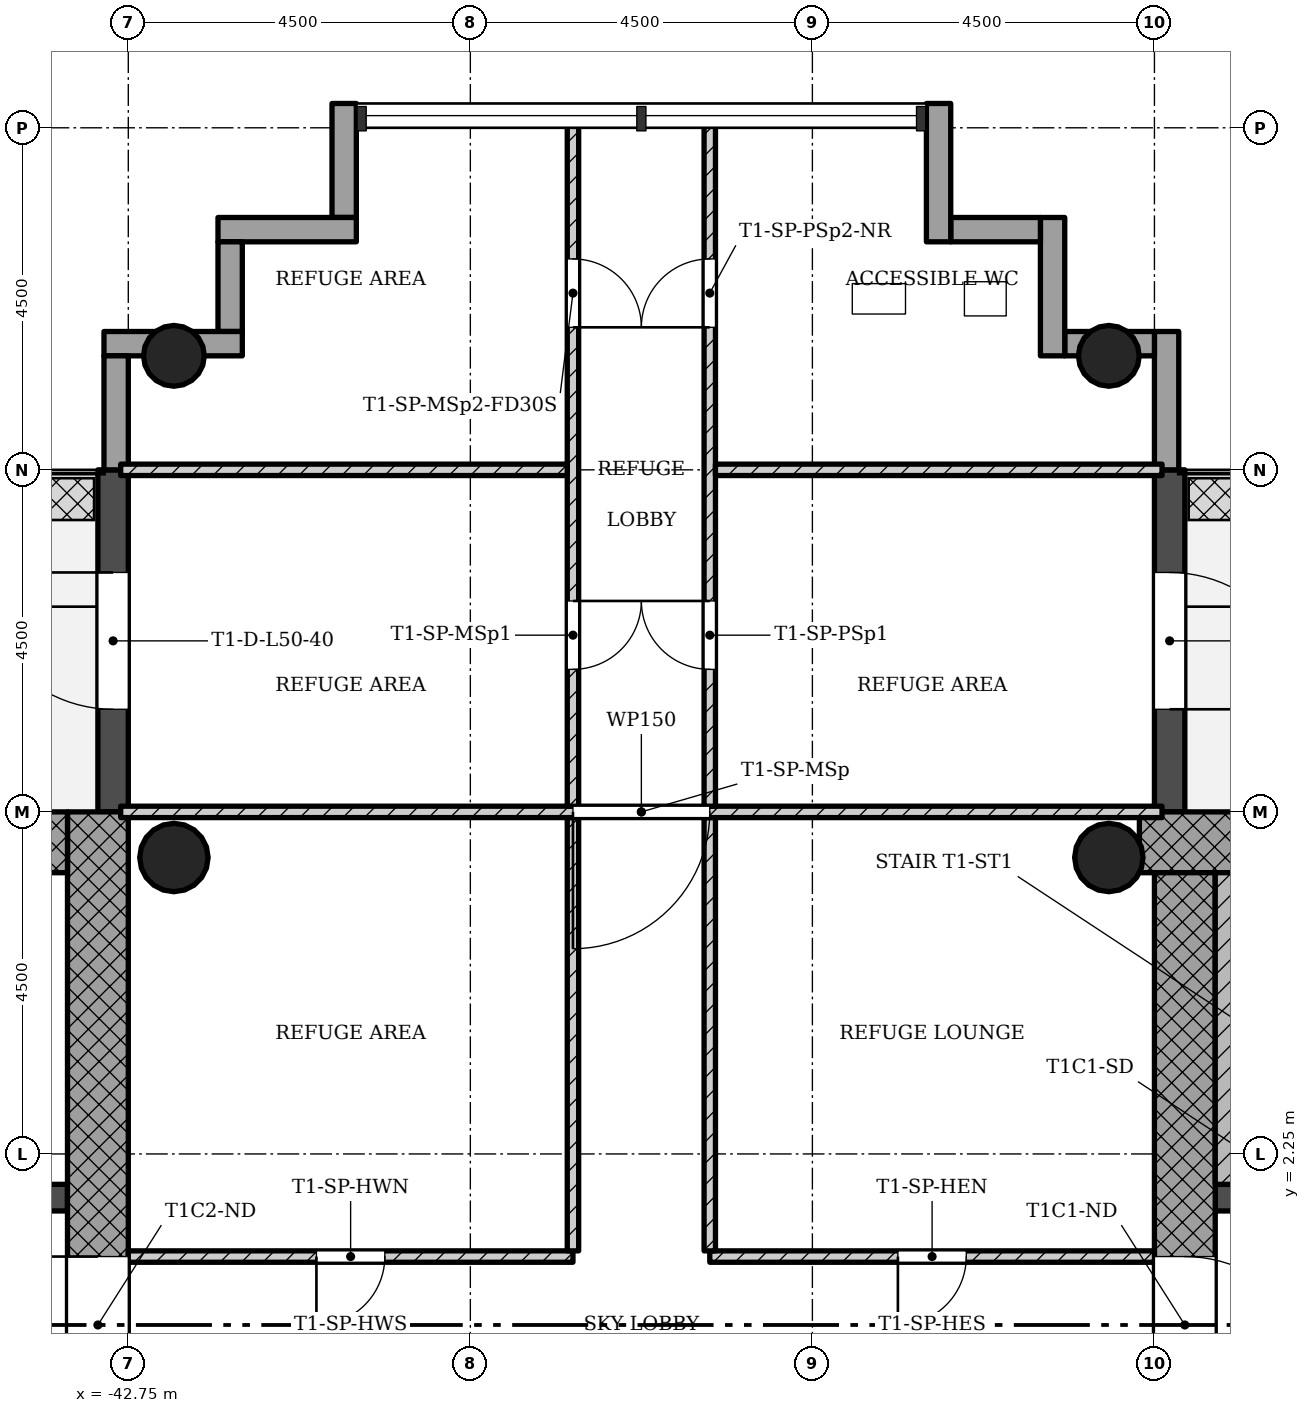
"""IFC4 building model, lengths in metres.
Left out: names, types, materials, properties, quantities, classifications, styles, units other than length and angle.
Written with IfcOpenShell. Run it as: python <this file> out.ifc"""

import sys

from ifc_helpers import new_model, si_unit, direction, frame, frame_2d, origin, origin_2d, place, context, subcontext, project, spatial, rectangle, hollow_circle, extrude, element, fill, save


model = new_model("IFC4")
c1 = context("Model", 3, precision=1e-05, world=origin(), true_north=direction((0.0, 1.0)))
c2 = subcontext(c1, "Body", "Model", "MODEL_VIEW")
j1 = project(units=[si_unit("LENGTHUNIT", "METRE"), si_unit("PLANEANGLEUNIT", "RADIAN")], contexts=[c1])
p1 = place(None, origin())
s1 = spatial("IfcSite", under=j1, at=p1, CompositionType="ELEMENT")
p2 = place(p1, origin())
s2 = spatial("IfcBuilding", under=s1, at=p2, CompositionType="ELEMENT")
p3 = place(p2, frame((0.0, 0.0, 181.3)))
s3 = spatial("IfcBuildingStorey", under=s2, at=p3, CompositionType="ELEMENT", Elevation=181.3)
p4 = place(p3, frame((-20.652, 6.35, 0.0), z_axis=(0.0, 0.0, 1.0), x_axis=(-1.0, 0.0, 0.0)))
e1 = element("IfcWall", 1, at=p4, inside=s3, PredefinedType="SHEAR", context=c2, shape_type="SweptSolid", body=[
    extrude(rectangle(XDim=8.796, YDim=0.8, at=frame_2d((4.398, 0.0))), origin(), (0.0, 0.0, 1.0), 4.5),
])
p5 = place(p3, frame((-28.85, 5.95, 0.0), z_axis=(0.0, 0.0, 1.0), x_axis=(0.0, -1.0, 0.0)))
e2 = element("IfcWall", 2, at=p5, inside=s3, PredefinedType="SHEAR", context=c2, shape_type="SweptSolid", body=[
    extrude(rectangle(XDim=12.7, YDim=0.8, at=frame_2d((6.35, 0.0))), origin(), (0.0, 0.0, 1.0), 4.5),
])
p6 = place(p5, frame((5.05, 0.0, 0.0)))
e3 = element("IfcOpeningElement", 3, at=p6, cuts=e2, PredefinedType="OPENING", context=c2, shape_type="SweptSolid", body=[
    extrude(rectangle(XDim=1.8, YDim=2.1, at=frame_2d((0.9, 1.05))), frame((0.0, 0.41, 0.0), z_axis=(0.0, -1.0, 0.0), x_axis=(1.0, 0.0, 0.0)), (0.0, 0.0, 1.0), 0.82),
])
p7 = place(p3, frame((-28.45, 1.675, 0.0), z_axis=(0.0, 0.0, 1.0), x_axis=(1.0, 0.0, 0.0)))
e4 = element("IfcWall", 4, at=p7, inside=s3, PredefinedType="SHEAR", context=c2, shape_type="SweptSolid", body=[
    extrude(rectangle(XDim=7.4, YDim=0.35, at=frame_2d((3.7, 0.0))), origin(), (0.0, 0.0, 1.0), 4.5),
])
p8 = place(p7, frame((0.85, 0.0, 0.0)))
e5 = element("IfcOpeningElement", 5, at=p8, cuts=e4, PredefinedType="OPENING", context=c2, shape_type="SweptSolid", body=[
    extrude(rectangle(XDim=0.9, YDim=2.1, at=frame_2d((0.45, 1.05))), frame((0.0, 0.185, 0.0), z_axis=(0.0, -1.0, 0.0), x_axis=(1.0, 0.0, 0.0)), (0.0, 0.0, 1.0), 0.37),
])
p9 = place(p3, frame((-43.15, -5.95, 0.0), z_axis=(0.0, 0.0, 1.0), x_axis=(0.0, 1.0, 0.0)))
e6 = element("IfcWall", 6, at=p9, inside=s3, PredefinedType="SHEAR", context=c2, shape_type="SweptSolid", body=[
    extrude(rectangle(XDim=12.7, YDim=0.8, at=frame_2d((6.35, 0.0))), origin(), (0.0, 0.0, 1.0), 4.5),
])
p10 = place(p9, frame((5.05, 0.0, 0.0)))
e7 = element("IfcOpeningElement", 7, at=p10, cuts=e6, PredefinedType="OPENING", context=c2, shape_type="SweptSolid", body=[
    extrude(rectangle(XDim=1.8, YDim=2.1, at=frame_2d((0.9, 1.05))), frame((0.0, 0.41, 0.0), z_axis=(0.0, -1.0, 0.0), x_axis=(1.0, 0.0, 0.0)), (0.0, 0.0, 1.0), 0.82),
])
p11 = place(p3, frame((-43.55, 6.35, 0.0), z_axis=(0.0, 0.0, 1.0), x_axis=(-1.0, 0.0, 0.0)))
e8 = element("IfcWall", 8, at=p11, inside=s3, PredefinedType="SHEAR", context=c2, shape_type="SweptSolid", body=[
    extrude(rectangle(XDim=8.2, YDim=0.8, at=frame_2d((4.1, 0.0))), origin(), (0.0, 0.0, 1.0), 4.5),
])
p12 = place(p3, frame((-50.95, 1.675, 0.0), z_axis=(0.0, 0.0, 1.0), x_axis=(1.0, 0.0, 0.0)))
e9 = element("IfcWall", 9, at=p12, inside=s3, PredefinedType="SHEAR", context=c2, shape_type="SweptSolid", body=[
    extrude(rectangle(XDim=7.4, YDim=0.35, at=frame_2d((3.7, 0.0))), origin(), (0.0, 0.0, 1.0), 4.5),
])
p13 = place(p12, frame((5.35, 0.0, 0.0)))
e10 = element("IfcOpeningElement", 10, at=p13, cuts=e9, PredefinedType="OPENING", context=c2, shape_type="SweptSolid", body=[
    extrude(rectangle(XDim=1.1, YDim=2.1, at=frame_2d((0.55, 1.05))), frame((0.0, 0.185, 0.0), z_axis=(0.0, -1.0, 0.0), x_axis=(1.0, 0.0, 0.0)), (0.0, 0.0, 1.0), 0.37),
])
p14 = place(p12, frame((1.0, 0.0, 0.0)))
e11 = element("IfcOpeningElement", 11, at=p14, cuts=e9, PredefinedType="OPENING", context=c2, shape_type="SweptSolid", body=[
    extrude(rectangle(XDim=1.1, YDim=2.1, at=frame_2d((0.55, 1.05))), frame((0.0, 0.185, 0.0), z_axis=(0.0, -1.0, 0.0), x_axis=(1.0, 0.0, 0.0)), (0.0, 0.0, 1.0), 0.37),
])
p15 = place(p12, frame((3.3, 0.0, 0.0)))
e12 = element("IfcOpeningElement", 12, at=p15, cuts=e9, PredefinedType="OPENING", context=c2, shape_type="SweptSolid", body=[
    extrude(rectangle(XDim=0.9, YDim=2.1, at=frame_2d((0.45, 1.05))), frame((0.0, 0.185, 0.0), z_axis=(0.0, -1.0, 0.0), x_axis=(1.0, 0.0, 0.0)), (0.0, 0.0, 1.0), 0.37),
])
for number, where, z_axis, x_axis in (
    (13, (-29.85, 12.75, 0.0), (0.0, 0.0, 1.0), (1.0, 0.0, 0.0)),
    (14, (-42.15, 12.75, 0.0), (0.0, 0.0, 1.0), (1.0, 0.0, 0.0)),
):
    element("IfcColumn", number, at=place(p3, frame(where, z_axis=z_axis, x_axis=x_axis)), inside=s3, PredefinedType="COLUMN", context=c2, shape_type="SweptSolid", body=[
        extrude(hollow_circle(Radius=0.4, WallThickness=0.028, at=origin_2d()), origin(), (0.0, 0.0, 1.0), 4.5),
    ])
for number, where, z_axis, x_axis in (
    (15, (-29.85, 6.15, 0.0), (0.0, 0.0, 1.0), (1.0, 0.0, 0.0)),
    (16, (-42.15, 6.15, 0.0), (0.0, 0.0, 1.0), (1.0, 0.0, 0.0)),
):
    element("IfcColumn", number, at=place(p3, frame(where, z_axis=z_axis, x_axis=x_axis)), inside=s3, PredefinedType="COLUMN", context=c2, shape_type="SweptSolid", body=[
        extrude(hollow_circle(Radius=0.45, WallThickness=0.032, at=origin_2d()), origin(), (0.0, 0.0, 1.0), 4.5),
    ])
p16 = place(p3, frame((-29.05, 6.75, -0.02), z_axis=(0.0, 0.0, 1.0), x_axis=(0.0, 1.0, 0.0)))
e17 = element("IfcWall", 17, at=p16, inside=s3, PredefinedType="STANDARD", context=c2, shape_type="SweptSolid", body=[
    extrude(rectangle(XDim=4.5, YDim=0.4, at=frame_2d((2.25, 0.0))), origin(), (0.0, 0.0, 1.0), 4.22),
])
p17 = place(p16, frame((1.35, 0.0, 0.02)))
e18 = element("IfcOpeningElement", 18, at=p17, cuts=e17, PredefinedType="OPENING", context=c2, shape_type="SweptSolid", body=[
    extrude(rectangle(XDim=1.8, YDim=2.1, at=frame_2d((0.9, 1.05))), frame((0.0, 0.21, 0.0), z_axis=(0.0, -1.0, 0.0), x_axis=(1.0, 0.0, 0.0)), (0.0, 0.0, 1.0), 0.42),
])
p18 = place(p3, frame((-29.09, 11.25, -0.3), z_axis=(0.0, 0.0, 1.0), x_axis=(0.0, 1.0, 0.0)))
e19 = element("IfcWall", 19, at=p18, inside=s3, PredefinedType="STANDARD", context=c2, shape_type="SweptSolid", body=[
    extrude(rectangle(XDim=1.82, YDim=0.32, at=frame_2d((0.91, 0.0))), origin(), (0.0, 0.0, 1.0), 4.5),
])
p19 = place(p3, frame((-29.25, 12.91, -0.3), z_axis=(0.0, 0.0, 1.0), x_axis=(-1.0, 0.0, 0.0)))
e20 = element("IfcWall", 20, at=p19, inside=s3, PredefinedType="STANDARD", context=c2, shape_type="SweptSolid", body=[
    extrude(rectangle(XDim=1.18, YDim=0.32, at=frame_2d((0.59, 0.0))), origin(), (0.0, 0.0, 1.0), 4.5),
])
p20 = place(p3, frame((-30.59, 12.75, -0.3), z_axis=(0.0, 0.0, 1.0), x_axis=(0.0, 1.0, 0.0)))
e21 = element("IfcWall", 21, at=p20, inside=s3, PredefinedType="STANDARD", context=c2, shape_type="SweptSolid", body=[
    extrude(rectangle(XDim=1.82, YDim=0.32, at=frame_2d((0.91, 0.0))), origin(), (0.0, 0.0, 1.0), 4.5),
])
p21 = place(p3, frame((-30.75, 14.41, -0.3), z_axis=(0.0, 0.0, 1.0), x_axis=(-1.0, 0.0, 0.0)))
e22 = element("IfcWall", 22, at=p21, inside=s3, PredefinedType="STANDARD", context=c2, shape_type="SweptSolid", body=[
    extrude(rectangle(XDim=1.18, YDim=0.32, at=frame_2d((0.59, 0.0))), origin(), (0.0, 0.0, 1.0), 4.5),
])
p22 = place(p3, frame((-32.09, 14.25, -0.3), z_axis=(0.0, 0.0, 1.0), x_axis=(0.0, 1.0, 0.0)))
e23 = element("IfcWall", 23, at=p22, inside=s3, PredefinedType="STANDARD", context=c2, shape_type="SweptSolid", body=[
    extrude(rectangle(XDim=1.82, YDim=0.32, at=frame_2d((0.91, 0.0))), origin(), (0.0, 0.0, 1.0), 4.5),
])
p23 = place(p3, frame((-39.91, 16.07, -0.3), z_axis=(0.0, 0.0, 1.0), x_axis=(0.0, -1.0, 0.0)))
e24 = element("IfcWall", 24, at=p23, inside=s3, PredefinedType="STANDARD", context=c2, shape_type="SweptSolid", body=[
    extrude(rectangle(XDim=1.5, YDim=0.32, at=frame_2d((0.75, 0.0))), origin(), (0.0, 0.0, 1.0), 4.5),
])
p24 = place(p3, frame((-39.75, 14.41, -0.3), z_axis=(0.0, 0.0, 1.0), x_axis=(-1.0, 0.0, 0.0)))
e25 = element("IfcWall", 25, at=p24, inside=s3, PredefinedType="STANDARD", context=c2, shape_type="SweptSolid", body=[
    extrude(rectangle(XDim=1.82, YDim=0.32, at=frame_2d((0.91, 0.0))), origin(), (0.0, 0.0, 1.0), 4.5),
])
p25 = place(p3, frame((-41.41, 14.25, -0.3), z_axis=(0.0, 0.0, 1.0), x_axis=(0.0, -1.0, 0.0)))
e26 = element("IfcWall", 26, at=p25, inside=s3, PredefinedType="STANDARD", context=c2, shape_type="SweptSolid", body=[
    extrude(rectangle(XDim=1.18, YDim=0.32, at=frame_2d((0.59, 0.0))), origin(), (0.0, 0.0, 1.0), 4.5),
])
p26 = place(p3, frame((-41.25, 12.91, -0.3), z_axis=(0.0, 0.0, 1.0), x_axis=(-1.0, 0.0, 0.0)))
e27 = element("IfcWall", 27, at=p26, inside=s3, PredefinedType="STANDARD", context=c2, shape_type="SweptSolid", body=[
    extrude(rectangle(XDim=1.82, YDim=0.32, at=frame_2d((0.91, 0.0))), origin(), (0.0, 0.0, 1.0), 4.5),
])
p27 = place(p3, frame((-42.91, 12.75, -0.3), z_axis=(0.0, 0.0, 1.0), x_axis=(0.0, -1.0, 0.0)))
e28 = element("IfcWall", 28, at=p27, inside=s3, PredefinedType="STANDARD", context=c2, shape_type="SweptSolid", body=[
    extrude(rectangle(XDim=1.5, YDim=0.32, at=frame_2d((0.75, 0.0))), origin(), (0.0, 0.0, 1.0), 4.5),
])
p28 = place(p3, frame((-42.95, 11.25, -0.02), z_axis=(0.0, 0.0, 1.0), x_axis=(0.0, -1.0, 0.0)))
e29 = element("IfcWall", 29, at=p28, inside=s3, PredefinedType="STANDARD", context=c2, shape_type="SweptSolid", body=[
    extrude(rectangle(XDim=4.5, YDim=0.4, at=frame_2d((2.25, 0.0))), origin(), (0.0, 0.0, 1.0), 4.22),
])
p29 = place(p28, frame((1.35, 0.0, 0.02)))
e30 = element("IfcOpeningElement", 30, at=p29, cuts=e29, PredefinedType="OPENING", context=c2, shape_type="SweptSolid", body=[
    extrude(rectangle(XDim=1.8, YDim=2.1, at=frame_2d((0.9, 1.05))), frame((0.0, 0.21, 0.0), z_axis=(0.0, -1.0, 0.0), x_axis=(1.0, 0.0, 0.0)), (0.0, 0.0, 1.0), 0.42),
])
p30 = place(p3, frame((-35.1, 0.9, 0.0), z_axis=(0.0, 0.0, 1.0), x_axis=(1.0, 0.0, 0.0)))
e31 = element("IfcWall", 31, at=p30, inside=s3, PredefinedType="PARTITIONING", context=c2, shape_type="SweptSolid", body=[
    extrude(rectangle(XDim=5.85, YDim=0.15, at=frame_2d((2.925, 0.0))), origin(), (0.0, 0.0, 1.0), 4.08),
])
p31 = place(p30, frame((2.475, 0.0, 0.0)))
e32 = element("IfcOpeningElement", 32, at=p31, cuts=e31, PredefinedType="OPENING", context=c2, shape_type="SweptSolid", body=[
    extrude(rectangle(XDim=0.9, YDim=2.1, at=frame_2d((0.45, 1.05))), frame((0.0, 0.085, 0.0), z_axis=(0.0, -1.0, 0.0), x_axis=(1.0, 0.0, 0.0)), (0.0, 0.0, 1.0), 0.17),
])
p32 = place(p3, frame((-35.1, 0.975, 0.0), z_axis=(0.0, 0.0, 1.0), x_axis=(0.0, 1.0, 0.0)))
e33 = element("IfcWall", 33, at=p32, inside=s3, PredefinedType="PARTITIONING", context=c2, shape_type="SweptSolid", body=[
    extrude(rectangle(XDim=5.7, YDim=0.15, at=frame_2d((2.85, 0.0))), origin(), (0.0, 0.0, 1.0), 4.08),
])
p33 = place(p3, frame((-42.75, 0.9, 0.0), z_axis=(0.0, 0.0, 1.0), x_axis=(1.0, 0.0, 0.0)))
e34 = element("IfcWall", 34, at=p33, inside=s3, PredefinedType="PARTITIONING", context=c2, shape_type="SweptSolid", body=[
    extrude(rectangle(XDim=5.85, YDim=0.15, at=frame_2d((2.925, 0.0))), origin(), (0.0, 0.0, 1.0), 4.08),
])
p34 = place(p33, frame((2.475, 0.0, 0.0)))
e35 = element("IfcOpeningElement", 35, at=p34, cuts=e34, PredefinedType="OPENING", context=c2, shape_type="SweptSolid", body=[
    extrude(rectangle(XDim=0.9, YDim=2.1, at=frame_2d((0.45, 1.05))), frame((0.0, 0.085, 0.0), z_axis=(0.0, -1.0, 0.0), x_axis=(1.0, 0.0, 0.0)), (0.0, 0.0, 1.0), 0.17),
])
p35 = place(p3, frame((-36.9, 0.975, 0.0), z_axis=(0.0, 0.0, 1.0), x_axis=(0.0, 1.0, 0.0)))
e36 = element("IfcWall", 36, at=p35, inside=s3, PredefinedType="PARTITIONING", context=c2, shape_type="SweptSolid", body=[
    extrude(rectangle(XDim=5.7, YDim=0.15, at=frame_2d((2.85, 0.0))), origin(), (0.0, 0.0, 1.0), 4.08),
])
p36 = place(p3, frame((-42.85, 6.75, 0.0), z_axis=(0.0, 0.0, 1.0), x_axis=(1.0, 0.0, 0.0)))
e37 = element("IfcWall", 37, at=p36, inside=s3, PredefinedType="PARTITIONING", context=c2, shape_type="SweptSolid", body=[
    extrude(rectangle(XDim=13.7, YDim=0.15, at=frame_2d((6.85, 0.0))), origin(), (0.0, 0.0, 1.0), 4.08),
])
p37 = place(p36, frame((5.95, 0.0, 0.0)))
e38 = element("IfcOpeningElement", 38, at=p37, cuts=e37, PredefinedType="OPENING", context=c2, shape_type="SweptSolid", body=[
    extrude(rectangle(XDim=1.8, YDim=2.1, at=frame_2d((0.9, 1.05))), frame((0.0, 0.085, 0.0), z_axis=(0.0, -1.0, 0.0), x_axis=(1.0, 0.0, 0.0)), (0.0, 0.0, 1.0), 0.17),
])
p38 = place(p3, frame((-35.1, 6.825, 0.0), z_axis=(0.0, 0.0, 1.0), x_axis=(0.0, 1.0, 0.0)))
e39 = element("IfcWall", 39, at=p38, inside=s3, PredefinedType="PARTITIONING", context=c2, shape_type="SweptSolid", body=[
    extrude(rectangle(XDim=9.025, YDim=0.15, at=frame_2d((4.513, 0.0))), origin(), (0.0, 0.0, 1.0), 4.08),
])
p39 = place(p38, frame((1.8, 0.0, 0.0)))
e40 = element("IfcOpeningElement", 40, at=p39, cuts=e39, PredefinedType="OPENING", context=c2, shape_type="SweptSolid", body=[
    extrude(rectangle(XDim=0.9, YDim=2.1, at=frame_2d((0.45, 1.05))), frame((0.0, 0.085, 0.0), z_axis=(0.0, -1.0, 0.0), x_axis=(1.0, 0.0, 0.0)), (0.0, 0.0, 1.0), 0.17),
])
p40 = place(p38, frame((6.3, 0.0, 0.0)))
e41 = element("IfcOpeningElement", 41, at=p40, cuts=e39, PredefinedType="OPENING", context=c2, shape_type="SweptSolid", body=[
    extrude(rectangle(XDim=0.9, YDim=2.1, at=frame_2d((0.45, 1.05))), frame((0.0, 0.085, 0.0), z_axis=(0.0, -1.0, 0.0), x_axis=(1.0, 0.0, 0.0)), (0.0, 0.0, 1.0), 0.17),
])
p41 = place(p3, frame((-35.025, 11.25, 0.0), z_axis=(0.0, 0.0, 1.0), x_axis=(1.0, 0.0, 0.0)))
e42 = element("IfcWall", 42, at=p41, inside=s3, PredefinedType="PARTITIONING", context=c2, shape_type="SweptSolid", body=[
    extrude(rectangle(XDim=5.875, YDim=0.15, at=frame_2d((2.938, 0.0))), origin(), (0.0, 0.0, 1.0), 4.08),
])
p42 = place(p3, frame((-36.9, 6.825, 0.0), z_axis=(0.0, 0.0, 1.0), x_axis=(0.0, 1.0, 0.0)))
e43 = element("IfcWall", 43, at=p42, inside=s3, PredefinedType="PARTITIONING", context=c2, shape_type="SweptSolid", body=[
    extrude(rectangle(XDim=9.025, YDim=0.15, at=frame_2d((4.513, 0.0))), origin(), (0.0, 0.0, 1.0), 4.08),
])
p43 = place(p42, frame((1.8, 0.0, 0.0)))
e44 = element("IfcOpeningElement", 44, at=p43, cuts=e43, PredefinedType="OPENING", context=c2, shape_type="SweptSolid", body=[
    extrude(rectangle(XDim=0.9, YDim=2.1, at=frame_2d((0.45, 1.05))), frame((0.0, 0.085, 0.0), z_axis=(0.0, -1.0, 0.0), x_axis=(1.0, 0.0, 0.0)), (0.0, 0.0, 1.0), 0.17),
])
p44 = place(p42, frame((6.3, 0.0, 0.0)))
e45 = element("IfcOpeningElement", 45, at=p44, cuts=e43, PredefinedType="OPENING", context=c2, shape_type="SweptSolid", body=[
    extrude(rectangle(XDim=0.9, YDim=2.1, at=frame_2d((0.45, 1.05))), frame((0.0, 0.085, 0.0), z_axis=(0.0, -1.0, 0.0), x_axis=(1.0, 0.0, 0.0)), (0.0, 0.0, 1.0), 0.17),
])
p45 = place(p3, frame((-36.975, 11.25, 0.0), z_axis=(0.0, 0.0, 1.0), x_axis=(-1.0, 0.0, 0.0)))
e46 = element("IfcWall", 46, at=p45, inside=s3, PredefinedType="PARTITIONING", context=c2, shape_type="SweptSolid", body=[
    extrude(rectangle(XDim=5.875, YDim=0.15, at=frame_2d((2.938, 0.0))), origin(), (0.0, 0.0, 1.0), 4.08),
])
p46 = place(p3, frame((-28.25, 1.85, 0.0), z_axis=(0.0, 0.0, 1.0), x_axis=(0.0, 1.0, 0.0)))
e47 = element("IfcWall", 47, at=p46, inside=s3, PredefinedType="SHEAR", context=c2, shape_type="SweptSolid", body=[
    extrude(rectangle(XDim=4.1, YDim=0.4, at=frame_2d((2.05, 0.0))), origin(), (0.0, 0.0, 1.0), 4.5),
])
p47 = place(p17, origin())
e48 = element("IfcDoor", 48, at=p47, inside=s3, OperationType="SINGLE_SWING_LEFT", PredefinedType="DOOR", context=c2, shape_type="SweptSolid", body=[
    extrude(rectangle(XDim=1.8, YDim=2.1, at=frame_2d((0.9, 1.05))), frame((0.0, 0.025, 0.0), z_axis=(0.0, -1.0, 0.0), x_axis=(1.0, 0.0, 0.0)), (0.0, 0.0, 1.0), 0.05),
])
fill(e18, e48)
p48 = place(p29, origin())
e49 = element("IfcDoor", 49, at=p48, inside=s3, OperationType="SINGLE_SWING_LEFT", PredefinedType="DOOR", context=c2, shape_type="SweptSolid", body=[
    extrude(rectangle(XDim=1.8, YDim=2.1, at=frame_2d((0.9, 1.05))), frame((0.0, 0.025, 0.0), z_axis=(0.0, -1.0, 0.0), x_axis=(1.0, 0.0, 0.0)), (0.0, 0.0, 1.0), 0.05),
])
fill(e30, e49)
p49 = place(p31, origin())
e50 = element("IfcDoor", 50, at=p49, inside=s3, OperationType="SINGLE_SWING_LEFT", PredefinedType="DOOR", context=c2, shape_type="SweptSolid", body=[
    extrude(rectangle(XDim=0.9, YDim=2.1, at=frame_2d((0.45, 1.05))), frame((0.0, 0.025, 0.0), z_axis=(0.0, -1.0, 0.0), x_axis=(1.0, 0.0, 0.0)), (0.0, 0.0, 1.0), 0.05),
])
fill(e32, e50)
p50 = place(p34, origin())
e51 = element("IfcDoor", 51, at=p50, inside=s3, OperationType="SINGLE_SWING_LEFT", PredefinedType="DOOR", context=c2, shape_type="SweptSolid", body=[
    extrude(rectangle(XDim=0.9, YDim=2.1, at=frame_2d((0.45, 1.05))), frame((0.0, 0.025, 0.0), z_axis=(0.0, -1.0, 0.0), x_axis=(1.0, 0.0, 0.0)), (0.0, 0.0, 1.0), 0.05),
])
fill(e35, e51)
p51 = place(p37, origin())
e52 = element("IfcDoor", 52, at=p51, inside=s3, OperationType="SINGLE_SWING_LEFT", PredefinedType="DOOR", context=c2, shape_type="SweptSolid", body=[
    extrude(rectangle(XDim=1.8, YDim=2.1, at=frame_2d((0.9, 1.05))), frame((0.0, 0.025, 0.0), z_axis=(0.0, -1.0, 0.0), x_axis=(1.0, 0.0, 0.0)), (0.0, 0.0, 1.0), 0.05),
])
fill(e38, e52)
p52 = place(p39, origin())
e53 = element("IfcDoor", 53, at=p52, inside=s3, OperationType="SINGLE_SWING_LEFT", PredefinedType="DOOR", context=c2, shape_type="SweptSolid", body=[
    extrude(rectangle(XDim=0.9, YDim=2.1, at=frame_2d((0.45, 1.05))), frame((0.0, 0.025, 0.0), z_axis=(0.0, -1.0, 0.0), x_axis=(1.0, 0.0, 0.0)), (0.0, 0.0, 1.0), 0.05),
])
fill(e40, e53)
p53 = place(p40, origin())
e54 = element("IfcDoor", 54, at=p53, inside=s3, OperationType="SINGLE_SWING_RIGHT", PredefinedType="DOOR", context=c2, shape_type="SweptSolid", body=[
    extrude(rectangle(XDim=0.9, YDim=2.1, at=frame_2d((0.45, 1.05))), frame((0.0, 0.025, 0.0), z_axis=(0.0, -1.0, 0.0), x_axis=(1.0, 0.0, 0.0)), (0.0, 0.0, 1.0), 0.05),
])
fill(e41, e54)
p54 = place(p43, origin())
e55 = element("IfcDoor", 55, at=p54, inside=s3, OperationType="SINGLE_SWING_RIGHT", PredefinedType="DOOR", context=c2, shape_type="SweptSolid", body=[
    extrude(rectangle(XDim=0.9, YDim=2.1, at=frame_2d((0.45, 1.05))), frame((0.0, 0.025, 0.0), z_axis=(0.0, -1.0, 0.0), x_axis=(1.0, 0.0, 0.0)), (0.0, 0.0, 1.0), 0.05),
])
fill(e44, e55)
p55 = place(p44, origin())
e56 = element("IfcDoor", 56, at=p55, inside=s3, OperationType="SINGLE_SWING_LEFT", PredefinedType="DOOR", context=c2, shape_type="SweptSolid", body=[
    extrude(rectangle(XDim=0.9, YDim=2.1, at=frame_2d((0.45, 1.05))), frame((0.0, 0.025, 0.0), z_axis=(0.0, -1.0, 0.0), x_axis=(1.0, 0.0, 0.0)), (0.0, 0.0, 1.0), 0.05),
])
fill(e45, e56)
p56 = place(p6, origin())
e57 = element("IfcDoor", 57, at=p56, inside=s3, OperationType="SINGLE_SWING_LEFT", PredefinedType="DOOR", context=c2, shape_type="SweptSolid", body=[
    extrude(rectangle(XDim=1.8, YDim=2.1, at=frame_2d((0.9, 1.05))), frame((0.0, 0.025, 0.0), z_axis=(0.0, -1.0, 0.0), x_axis=(1.0, 0.0, 0.0)), (0.0, 0.0, 1.0), 0.05),
])
fill(e3, e57)
p57 = place(p10, origin())
e58 = element("IfcDoor", 58, at=p57, inside=s3, OperationType="SINGLE_SWING_LEFT", PredefinedType="DOOR", context=c2, shape_type="SweptSolid", body=[
    extrude(rectangle(XDim=1.8, YDim=2.1, at=frame_2d((0.9, 1.05))), frame((0.0, 0.025, 0.0), z_axis=(0.0, -1.0, 0.0), x_axis=(1.0, 0.0, 0.0)), (0.0, 0.0, 1.0), 0.05),
])
fill(e7, e58)
save(model, sys.argv[1])
